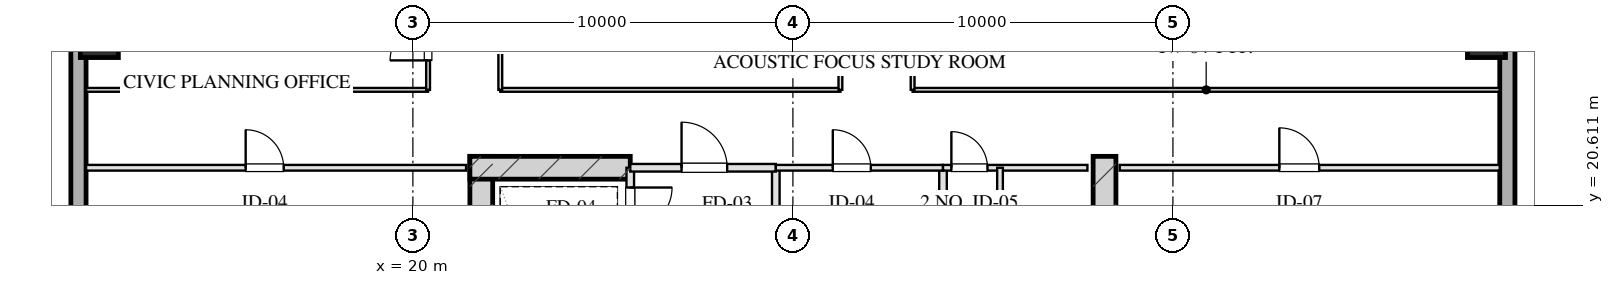
"""IFC4 building model, lengths in metres.
Left out: names, types, materials, properties, quantities, classifications, styles, units other than length and angle.
Written with IfcOpenShell. Run it as: python <this file> out.ifc"""

import sys

from ifc_helpers import new_model, si_unit, direction, frame, frame_2d, origin, origin_2d, place, context, subcontext, project, spatial, rectangle, hollow_rectangle, extrude, element, fill, save


model = new_model("IFC4")
c1 = context("Model", 3, precision=1e-05, world=origin(), true_north=direction((0.0, 1.0)))
c2 = subcontext(c1, "Body", "Model", "MODEL_VIEW")
j1 = project(units=[si_unit("LENGTHUNIT", "METRE"), si_unit("PLANEANGLEUNIT", "RADIAN")], contexts=[c1])
p1 = place(None, origin())
s1 = spatial("IfcSite", under=j1, at=p1, CompositionType="ELEMENT")
p2 = place(p1, origin())
s2 = spatial("IfcBuilding", under=s1, at=p2, CompositionType="ELEMENT")
p3 = place(p2, frame((0.0, 0.0, 149.5)))
s3 = spatial("IfcBuildingStorey", under=s2, at=p3, CompositionType="ELEMENT", Elevation=149.5)
for number, where, z_axis, x_axis in (
    (1, (21.8, 21.9, 0.0), (0.0, 0.0, 1.0), (0.0, -1.0, 0.0)),
    (2, (38.2, 21.9, 0.0), (0.0, 0.0, 1.0), (0.0, -1.0, 0.0)),
):
    element("IfcWall", number, at=place(p3, frame(where, z_axis=z_axis, x_axis=x_axis)), inside=s3, PredefinedType="SHEAR", context=c2, shape_type="SweptSolid", body=[
        extrude(rectangle(XDim=9.48, YDim=0.6, at=frame_2d((4.74, 0.0))), origin(), (0.0, 0.0, 1.0), 3.45),
    ])
p4 = place(p3, frame((21.5, 21.6, 0.0), z_axis=(0.0, 0.0, 1.0), x_axis=(1.0, 0.0, 0.0)))
e3 = element("IfcWall", 3, at=p4, inside=s3, PredefinedType="SHEAR", context=c2, shape_type="SweptSolid", body=[
    extrude(rectangle(XDim=4.22, YDim=0.6, at=frame_2d((2.11, 0.0))), origin(), (0.0, 0.0, 1.0), 3.45),
])
for number, where, z_axis, x_axis in (
    (4, (11.75, 25.0, 0.0), (0.0, 0.0, 1.0), (1.0, 0.0, 0.0)),
    (5, (48.25, 25.0, 0.0), (0.0, 0.0, 1.0), (1.0, 0.0, 0.0)),
):
    element("IfcColumn", number, at=place(p3, frame(where, z_axis=z_axis, x_axis=x_axis)), inside=s3, PredefinedType="COLUMN", context=c2, shape_type="SweptSolid", body=[
        extrude(hollow_rectangle(XDim=1.0, YDim=1.0, WallThickness=0.036, at=origin_2d()), origin(), (0.0, 0.0, 1.0), 3.451),
    ])
p5 = place(p3, frame((11.2, 9.0, 0.0), z_axis=(0.0, 0.0, 1.0), x_axis=(0.0, 1.0, 0.0)))
e6 = element("IfcWall", 6, at=p5, inside=s3, PredefinedType="SOLIDWALL", context=c2, shape_type="SweptSolid", body=[
    extrude(rectangle(XDim=50.0, YDim=0.4, at=frame_2d((25.0, 0.0))), origin(), (0.0, 0.0, 1.0), 2.61),
])
p6 = place(p3, frame((48.8, 59.0, 0.0), z_axis=(0.0, 0.0, 1.0), x_axis=(0.0, -1.0, 0.0)))
e7 = element("IfcWall", 7, at=p6, inside=s3, PredefinedType="SOLIDWALL", context=c2, shape_type="SweptSolid", body=[
    extrude(rectangle(XDim=50.0, YDim=0.4, at=frame_2d((25.0, 0.0))), origin(), (0.0, 0.0, 1.0), 2.61),
])
p7 = place(p6, frame((30.275, 0.0, 0.75)))
e8 = element("IfcOpeningElement", 8, at=p7, cuts=e7, PredefinedType="OPENING", context=c2, shape_type="SweptSolid", body=[
    extrude(rectangle(XDim=2.25, YDim=1.46, at=frame_2d((1.125, 0.73))), frame((0.0, 0.21, 0.0), z_axis=(0.0, -1.0, 0.0), x_axis=(1.0, 0.0, 0.0)), (0.0, 0.0, 1.0), 0.42),
])
p8 = place(p6, frame((17.475, 0.0, 0.75)))
e9 = element("IfcOpeningElement", 9, at=p8, cuts=e7, PredefinedType="OPENING", context=c2, shape_type="SweptSolid", body=[
    extrude(rectangle(XDim=2.25, YDim=1.46, at=frame_2d((1.125, 0.73))), frame((0.0, 0.21, 0.0), z_axis=(0.0, -1.0, 0.0), x_axis=(1.0, 0.0, 0.0)), (0.0, 0.0, 1.0), 0.42),
])
p9 = place(p3, frame((25.72, 21.6, 0.0), z_axis=(0.0, 0.0, 1.0), x_axis=(0.0, -1.0, 0.0)))
e10 = element("IfcWall", 10, at=p9, inside=s3, PredefinedType="PARTITIONING", context=c2, shape_type="SweptSolid", body=[
    extrude(rectangle(XDim=1.9, YDim=0.2, at=frame_2d((0.95, 0.0))), origin(), (0.0, 0.0, 1.0), 3.175),
])
p10 = place(p9, frame((0.52, 0.0, 0.0)))
e11 = element("IfcOpeningElement", 11, at=p10, cuts=e10, PredefinedType="OPENING", context=c2, shape_type="SweptSolid", body=[
    extrude(rectangle(XDim=1.1, YDim=2.05, at=frame_2d((0.55, 1.025))), frame((0.0, 0.11, 0.0), z_axis=(0.0, -1.0, 0.0), x_axis=(1.0, 0.0, 0.0)), (0.0, 0.0, 1.0), 0.22),
])
p11 = place(p3, frame((29.55, 21.6, 0.0), z_axis=(0.0, 0.0, 1.0), x_axis=(0.0, -1.0, 0.0)))
e12 = element("IfcWall", 12, at=p11, inside=s3, PredefinedType="PARTITIONING", context=c2, shape_type="SweptSolid", body=[
    extrude(rectangle(XDim=8.43, YDim=0.2, at=frame_2d((4.215, 0.0))), origin(), (0.0, 0.0, 1.0), 3.175),
])
p12 = place(p3, frame((25.72, 21.6, 0.0), z_axis=(0.0, 0.0, 1.0), x_axis=(1.0, 0.0, 0.0)))
e13 = element("IfcWall", 13, at=p12, inside=s3, PredefinedType="PARTITIONING", context=c2, shape_type="SweptSolid", body=[
    extrude(rectangle(XDim=3.83, YDim=0.2, at=frame_2d((1.915, 0.0))), origin(), (0.0, 0.0, 1.0), 3.175),
])
p13 = place(p12, frame((1.35, 0.0, 0.0)))
e14 = element("IfcOpeningElement", 14, at=p13, cuts=e13, PredefinedType="OPENING", context=c2, shape_type="SweptSolid", body=[
    extrude(rectangle(XDim=1.2, YDim=2.05, at=frame_2d((0.6, 1.025))), frame((0.0, 0.11, 0.0), z_axis=(0.0, -1.0, 0.0), x_axis=(1.0, 0.0, 0.0)), (0.0, 0.0, 1.0), 0.22),
])
p14 = place(p3, frame((33.95, 21.6, 0.0), z_axis=(0.0, 0.0, 1.0), x_axis=(0.0, -1.0, 0.0)))
e15 = element("IfcWall", 15, at=p14, inside=s3, PredefinedType="PARTITIONING", context=c2, shape_type="SweptSolid", body=[
    extrude(rectangle(XDim=8.43, YDim=0.2, at=frame_2d((4.215, 0.0))), origin(), (0.0, 0.0, 1.0), 3.175),
])
p15 = place(p3, frame((29.55, 21.6, 0.0), z_axis=(0.0, 0.0, 1.0), x_axis=(1.0, 0.0, 0.0)))
e16 = element("IfcWall", 16, at=p15, inside=s3, PredefinedType="PARTITIONING", context=c2, shape_type="SweptSolid", body=[
    extrude(rectangle(XDim=4.4, YDim=0.15, at=frame_2d((2.2, 0.0))), origin(), (0.0, 0.0, 1.0), 3.175),
])
p16 = place(p15, frame((1.5, 0.0, 0.0)))
e17 = element("IfcOpeningElement", 17, at=p16, cuts=e16, PredefinedType="OPENING", context=c2, shape_type="SweptSolid", body=[
    extrude(rectangle(XDim=1.0, YDim=2.05, at=frame_2d((0.5, 1.025))), frame((0.0, 0.085, 0.0), z_axis=(0.0, -1.0, 0.0), x_axis=(1.0, 0.0, 0.0)), (0.0, 0.0, 1.0), 0.17),
])
p17 = place(p3, frame((33.95, 21.6, 0.0), z_axis=(0.0, 0.0, 1.0), x_axis=(1.0, 0.0, 0.0)))
e18 = element("IfcWall", 18, at=p17, inside=s3, PredefinedType="PARTITIONING", context=c2, shape_type="SweptSolid", body=[
    extrude(rectangle(XDim=3.8, YDim=0.15, at=frame_2d((1.9, 0.0))), origin(), (0.0, 0.0, 1.0), 3.175),
])
p18 = place(p17, frame((0.22, 0.0, 0.0)))
e19 = element("IfcOpeningElement", 19, at=p18, cuts=e18, PredefinedType="OPENING", context=c2, shape_type="SweptSolid", body=[
    extrude(rectangle(XDim=0.95, YDim=2.05, at=frame_2d((0.475, 1.025))), frame((0.0, 0.085, 0.0), z_axis=(0.0, -1.0, 0.0), x_axis=(1.0, 0.0, 0.0)), (0.0, 0.0, 1.0), 0.17),
])
p19 = place(p3, frame((35.45, 21.6, 0.0), z_axis=(0.0, 0.0, 1.0), x_axis=(0.0, -1.0, 0.0)))
e20 = element("IfcWall", 20, at=p19, inside=s3, PredefinedType="PARTITIONING", context=c2, shape_type="SweptSolid", body=[
    extrude(rectangle(XDim=8.43, YDim=0.15, at=frame_2d((4.215, 0.0))), origin(), (0.0, 0.0, 1.0), 2.815),
])
p20 = place(p19, frame((2.55, 0.0, 0.0)))
e21 = element("IfcOpeningElement", 21, at=p20, cuts=e20, PredefinedType="OPENING", context=c2, shape_type="SweptSolid", body=[
    extrude(rectangle(XDim=0.95, YDim=2.05, at=frame_2d((0.475, 1.025))), frame((0.0, 0.085, 0.0), z_axis=(0.0, -1.0, 0.0), x_axis=(1.0, 0.0, 0.0)), (0.0, 0.0, 1.0), 0.17),
])
p21 = place(p19, frame((4.7, 0.0, 0.0)))
e22 = element("IfcOpeningElement", 22, at=p21, cuts=e20, PredefinedType="OPENING", context=c2, shape_type="SweptSolid", body=[
    extrude(rectangle(XDim=0.9, YDim=2.05, at=frame_2d((0.45, 1.025))), frame((0.0, 0.085, 0.0), z_axis=(0.0, -1.0, 0.0), x_axis=(1.0, 0.0, 0.0)), (0.0, 0.0, 1.0), 0.17),
])
p22 = place(p19, frame((6.8, 0.0, 0.0)))
e23 = element("IfcOpeningElement", 23, at=p22, cuts=e20, PredefinedType="OPENING", context=c2, shape_type="SweptSolid", body=[
    extrude(rectangle(XDim=0.9, YDim=2.05, at=frame_2d((0.45, 1.025))), frame((0.0, 0.085, 0.0), z_axis=(0.0, -1.0, 0.0), x_axis=(1.0, 0.0, 0.0)), (0.0, 0.0, 1.0), 0.17),
])
p23 = place(p3, frame((11.4, 21.6, 0.0), z_axis=(0.0, 0.0, 1.0), x_axis=(1.0, 0.0, 0.0)))
e24 = element("IfcWall", 24, at=p23, inside=s3, PredefinedType="PARTITIONING", context=c2, shape_type="SweptSolid", body=[
    extrude(rectangle(XDim=10.0, YDim=0.15, at=frame_2d((5.0, 0.0))), origin(), (0.0, 0.0, 1.0), 3.175),
])
p24 = place(p23, frame((4.2, 0.0, 0.0)))
e25 = element("IfcOpeningElement", 25, at=p24, cuts=e24, PredefinedType="OPENING", context=c2, shape_type="SweptSolid", body=[
    extrude(rectangle(XDim=1.0, YDim=2.05, at=frame_2d((0.5, 1.025))), frame((0.0, 0.085, 0.0), z_axis=(0.0, -1.0, 0.0), x_axis=(1.0, 0.0, 0.0)), (0.0, 0.0, 1.0), 0.17),
])
p25 = place(p3, frame((38.6, 21.6, 0.0), z_axis=(0.0, 0.0, 1.0), x_axis=(1.0, 0.0, 0.0)))
e26 = element("IfcWall", 26, at=p25, inside=s3, PredefinedType="PARTITIONING", context=c2, shape_type="SweptSolid", body=[
    extrude(rectangle(XDim=10.0, YDim=0.15, at=frame_2d((5.0, 0.0))), origin(), (0.0, 0.0, 1.0), 3.175),
])
p26 = place(p25, frame((4.2, 0.0, 0.0)))
e27 = element("IfcOpeningElement", 27, at=p26, cuts=e26, PredefinedType="OPENING", context=c2, shape_type="SweptSolid", body=[
    extrude(rectangle(XDim=1.05, YDim=2.05, at=frame_2d((0.525, 1.025))), frame((0.0, 0.085, 0.0), z_axis=(0.0, -1.0, 0.0), x_axis=(1.0, 0.0, 0.0)), (0.0, 0.0, 1.0), 0.17),
])
p27 = place(p3, frame((11.4, 23.65, 0.0), z_axis=(0.0, 0.0, 1.0), x_axis=(1.0, 0.0, 0.0)))
e28 = element("IfcWall", 28, at=p27, inside=s3, PredefinedType="MOVABLE", context=c2, shape_type="SweptSolid", body=[
    extrude(rectangle(XDim=9.0, YDim=0.1, at=frame_2d((4.5, 0.0))), origin(), (0.0, 0.0, 1.0), 3.175),
])
p28 = place(p3, frame((22.3, 23.65, 0.0), z_axis=(0.0, 0.0, 1.0), x_axis=(1.0, 0.0, 0.0)))
e29 = element("IfcWall", 29, at=p28, inside=s3, PredefinedType="MOVABLE", context=c2, shape_type="SweptSolid", body=[
    extrude(rectangle(XDim=8.95, YDim=0.1, at=frame_2d((4.475, 0.0))), origin(), (0.0, 0.0, 1.0), 3.175),
])
p29 = place(p3, frame((33.15, 23.65, 0.0), z_axis=(0.0, 0.0, 1.0), x_axis=(1.0, 0.0, 0.0)))
e30 = element("IfcWall", 30, at=p29, inside=s3, PredefinedType="MOVABLE", context=c2, shape_type="SweptSolid", body=[
    extrude(rectangle(XDim=15.45, YDim=0.1, at=frame_2d((7.725, 0.0))), origin(), (0.0, 0.0, 1.0), 3.175),
])
p30 = place(p3, frame((20.4, 23.65, 0.0), z_axis=(0.0, 0.0, 1.0), x_axis=(0.0, 1.0, 0.0)))
e31 = element("IfcWall", 31, at=p30, inside=s3, PredefinedType="MOVABLE", context=c2, shape_type="SweptSolid", body=[
    extrude(rectangle(XDim=20.7, YDim=0.1, at=frame_2d((10.35, 0.0))), origin(), (0.0, 0.0, 1.0), 3.175),
])
p31 = place(p30, frame((0.775, 0.0, 0.0)))
e32 = element("IfcOpeningElement", 32, at=p31, cuts=e31, PredefinedType="OPENING", context=c2, shape_type="SweptSolid", body=[
    extrude(rectangle(XDim=1.0, YDim=2.05, at=frame_2d((0.5, 1.025))), frame((0.0, 0.06, 0.0), z_axis=(0.0, -1.0, 0.0), x_axis=(1.0, 0.0, 0.0)), (0.0, 0.0, 1.0), 0.12),
])
p32 = place(p30, frame((5.35, 0.0, 0.0)))
e33 = element("IfcOpeningElement", 33, at=p32, cuts=e31, PredefinedType="OPENING", context=c2, shape_type="SweptSolid", body=[
    extrude(rectangle(XDim=0.85, YDim=2.05, at=frame_2d((0.425, 1.025))), frame((0.0, 0.06, 0.0), z_axis=(0.0, -1.0, 0.0), x_axis=(1.0, 0.0, 0.0)), (0.0, 0.0, 1.0), 0.12),
])
p33 = place(p30, frame((9.85, 0.0, 0.0)))
e34 = element("IfcOpeningElement", 34, at=p33, cuts=e31, PredefinedType="OPENING", context=c2, shape_type="SweptSolid", body=[
    extrude(rectangle(XDim=1.0, YDim=2.05, at=frame_2d((0.5, 1.025))), frame((0.0, 0.06, 0.0), z_axis=(0.0, -1.0, 0.0), x_axis=(1.0, 0.0, 0.0)), (0.0, 0.0, 1.0), 0.12),
])
p34 = place(p30, frame((14.35, 0.0, 0.0)))
e35 = element("IfcOpeningElement", 35, at=p34, cuts=e31, PredefinedType="OPENING", context=c2, shape_type="SweptSolid", body=[
    extrude(rectangle(XDim=1.0, YDim=2.05, at=frame_2d((0.5, 1.025))), frame((0.0, 0.06, 0.0), z_axis=(0.0, -1.0, 0.0), x_axis=(1.0, 0.0, 0.0)), (0.0, 0.0, 1.0), 0.12),
])
p35 = place(p30, frame((18.925, 0.0, 0.0)))
e36 = element("IfcOpeningElement", 36, at=p35, cuts=e31, PredefinedType="OPENING", context=c2, shape_type="SweptSolid", body=[
    extrude(rectangle(XDim=1.05, YDim=2.05, at=frame_2d((0.525, 1.025))), frame((0.0, 0.06, 0.0), z_axis=(0.0, -1.0, 0.0), x_axis=(1.0, 0.0, 0.0)), (0.0, 0.0, 1.0), 0.12),
])
p36 = place(p3, frame((22.3, 23.65, 0.0), z_axis=(0.0, 0.0, 1.0), x_axis=(0.0, 1.0, 0.0)))
e37 = element("IfcWall", 37, at=p36, inside=s3, PredefinedType="MOVABLE", context=c2, shape_type="SweptSolid", body=[
    extrude(rectangle(XDim=20.7, YDim=0.1, at=frame_2d((10.35, 0.0))), origin(), (0.0, 0.0, 1.0), 3.175),
])
p37 = place(p36, frame((2.857, 0.0, 0.0)))
e38 = element("IfcOpeningElement", 38, at=p37, cuts=e37, PredefinedType="OPENING", context=c2, shape_type="SweptSolid", body=[
    extrude(rectangle(XDim=1.1, YDim=2.05, at=frame_2d((0.55, 1.025))), frame((0.0, 0.06, 0.0), z_axis=(0.0, -1.0, 0.0), x_axis=(1.0, 0.0, 0.0)), (0.0, 0.0, 1.0), 0.12),
])
p38 = place(p36, frame((17.208, 0.0, 0.0)))
e39 = element("IfcOpeningElement", 39, at=p38, cuts=e37, PredefinedType="OPENING", context=c2, shape_type="SweptSolid", body=[
    extrude(rectangle(XDim=1.1, YDim=2.05, at=frame_2d((0.55, 1.025))), frame((0.0, 0.06, 0.0), z_axis=(0.0, -1.0, 0.0), x_axis=(1.0, 0.0, 0.0)), (0.0, 0.0, 1.0), 0.12),
])
p39 = place(p3, frame((31.25, 23.65, 0.0), z_axis=(0.0, 0.0, 1.0), x_axis=(0.0, 1.0, 0.0)))
e40 = element("IfcWall", 40, at=p39, inside=s3, PredefinedType="MOVABLE", context=c2, shape_type="SweptSolid", body=[
    extrude(rectangle(XDim=20.7, YDim=0.1, at=frame_2d((10.35, 0.0))), origin(), (0.0, 0.0, 1.0), 3.175),
])
p40 = place(p39, frame((9.71, 0.0, 0.0)))
e41 = element("IfcOpeningElement", 41, at=p40, cuts=e40, PredefinedType="OPENING", context=c2, shape_type="SweptSolid", body=[
    extrude(rectangle(XDim=1.1, YDim=2.05, at=frame_2d((0.55, 1.025))), frame((0.0, 0.06, 0.0), z_axis=(0.0, -1.0, 0.0), x_axis=(1.0, 0.0, 0.0)), (0.0, 0.0, 1.0), 0.12),
])
p41 = place(p3, frame((33.15, 23.65, 0.0), z_axis=(0.0, 0.0, 1.0), x_axis=(0.0, 1.0, 0.0)))
e42 = element("IfcWall", 42, at=p41, inside=s3, PredefinedType="MOVABLE", context=c2, shape_type="SweptSolid", body=[
    extrude(rectangle(XDim=20.7, YDim=0.1, at=frame_2d((10.35, 0.0))), origin(), (0.0, 0.0, 1.0), 3.175),
])
p42 = place(p41, frame((2.667, 0.0, 0.0)))
e43 = element("IfcOpeningElement", 43, at=p42, cuts=e42, PredefinedType="OPENING", context=c2, shape_type="SweptSolid", body=[
    extrude(rectangle(XDim=1.0, YDim=2.05, at=frame_2d((0.5, 1.025))), frame((0.0, 0.06, 0.0), z_axis=(0.0, -1.0, 0.0), x_axis=(1.0, 0.0, 0.0)), (0.0, 0.0, 1.0), 0.12),
])
p43 = place(p41, frame((9.843, 0.0, 0.0)))
e44 = element("IfcOpeningElement", 44, at=p43, cuts=e42, PredefinedType="OPENING", context=c2, shape_type="SweptSolid", body=[
    extrude(rectangle(XDim=1.0, YDim=2.05, at=frame_2d((0.5, 1.025))), frame((0.0, 0.06, 0.0), z_axis=(0.0, -1.0, 0.0), x_axis=(1.0, 0.0, 0.0)), (0.0, 0.0, 1.0), 0.12),
])
p44 = place(p41, frame((17.025, 0.0, 0.0)))
e45 = element("IfcOpeningElement", 45, at=p44, cuts=e42, PredefinedType="OPENING", context=c2, shape_type="SweptSolid", body=[
    extrude(rectangle(XDim=1.0, YDim=2.05, at=frame_2d((0.5, 1.025))), frame((0.0, 0.06, 0.0), z_axis=(0.0, -1.0, 0.0), x_axis=(1.0, 0.0, 0.0)), (0.0, 0.0, 1.0), 0.12),
])
p45 = place(p10, origin())
e46 = element("IfcDoor", 46, at=p45, inside=s3, OperationType="SINGLE_SWING_LEFT", PredefinedType="DOOR", context=c2, shape_type="SweptSolid", body=[
    extrude(rectangle(XDim=1.1, YDim=2.05, at=frame_2d((0.55, 1.025))), frame((0.0, 0.025, 0.0), z_axis=(0.0, -1.0, 0.0), x_axis=(1.0, 0.0, 0.0)), (0.0, 0.0, 1.0), 0.05),
])
fill(e11, e46)
p46 = place(p13, origin())
e47 = element("IfcDoor", 47, at=p46, inside=s3, OperationType="SINGLE_SWING_LEFT", PredefinedType="DOOR", context=c2, shape_type="SweptSolid", body=[
    extrude(rectangle(XDim=1.2, YDim=2.05, at=frame_2d((0.6, 1.025))), frame((0.0, 0.025, 0.0), z_axis=(0.0, -1.0, 0.0), x_axis=(1.0, 0.0, 0.0)), (0.0, 0.0, 1.0), 0.05),
])
fill(e14, e47)
p47 = place(p16, origin())
e48 = element("IfcDoor", 48, at=p47, inside=s3, OperationType="SINGLE_SWING_LEFT", PredefinedType="DOOR", context=c2, shape_type="SweptSolid", body=[
    extrude(rectangle(XDim=1.0, YDim=2.05, at=frame_2d((0.5, 1.025))), frame((0.0, 0.025, 0.0), z_axis=(0.0, -1.0, 0.0), x_axis=(1.0, 0.0, 0.0)), (0.0, 0.0, 1.0), 0.05),
])
fill(e17, e48)
p48 = place(p18, origin())
e49 = element("IfcDoor", 49, at=p48, inside=s3, OperationType="SINGLE_SWING_LEFT", PredefinedType="DOOR", context=c2, shape_type="SweptSolid", body=[
    extrude(rectangle(XDim=0.95, YDim=2.05, at=frame_2d((0.475, 1.025))), frame((0.0, 0.025, 0.0), z_axis=(0.0, -1.0, 0.0), x_axis=(1.0, 0.0, 0.0)), (0.0, 0.0, 1.0), 0.05),
])
fill(e19, e49)
p49 = place(p24, origin())
e50 = element("IfcDoor", 50, at=p49, inside=s3, OperationType="SINGLE_SWING_LEFT", PredefinedType="DOOR", context=c2, shape_type="SweptSolid", body=[
    extrude(rectangle(XDim=1.0, YDim=2.05, at=frame_2d((0.5, 1.025))), frame((0.0, 0.025, 0.0), z_axis=(0.0, -1.0, 0.0), x_axis=(1.0, 0.0, 0.0)), (0.0, 0.0, 1.0), 0.05),
])
fill(e25, e50)
p50 = place(p26, origin())
e51 = element("IfcDoor", 51, at=p50, inside=s3, OperationType="SINGLE_SWING_LEFT", PredefinedType="DOOR", context=c2, shape_type="SweptSolid", body=[
    extrude(rectangle(XDim=1.05, YDim=2.05, at=frame_2d((0.525, 1.025))), frame((0.0, 0.025, 0.0), z_axis=(0.0, -1.0, 0.0), x_axis=(1.0, 0.0, 0.0)), (0.0, 0.0, 1.0), 0.05),
])
fill(e27, e51)
p51 = place(p31, origin())
e52 = element("IfcDoor", 52, at=p51, inside=s3, OperationType="SINGLE_SWING_LEFT", PredefinedType="DOOR", context=c2, shape_type="SweptSolid", body=[
    extrude(rectangle(XDim=1.0, YDim=2.05, at=frame_2d((0.5, 1.025))), frame((0.0, 0.025, 0.0), z_axis=(0.0, -1.0, 0.0), x_axis=(1.0, 0.0, 0.0)), (0.0, 0.0, 1.0), 0.05),
])
fill(e32, e52)
save(model, sys.argv[1])
